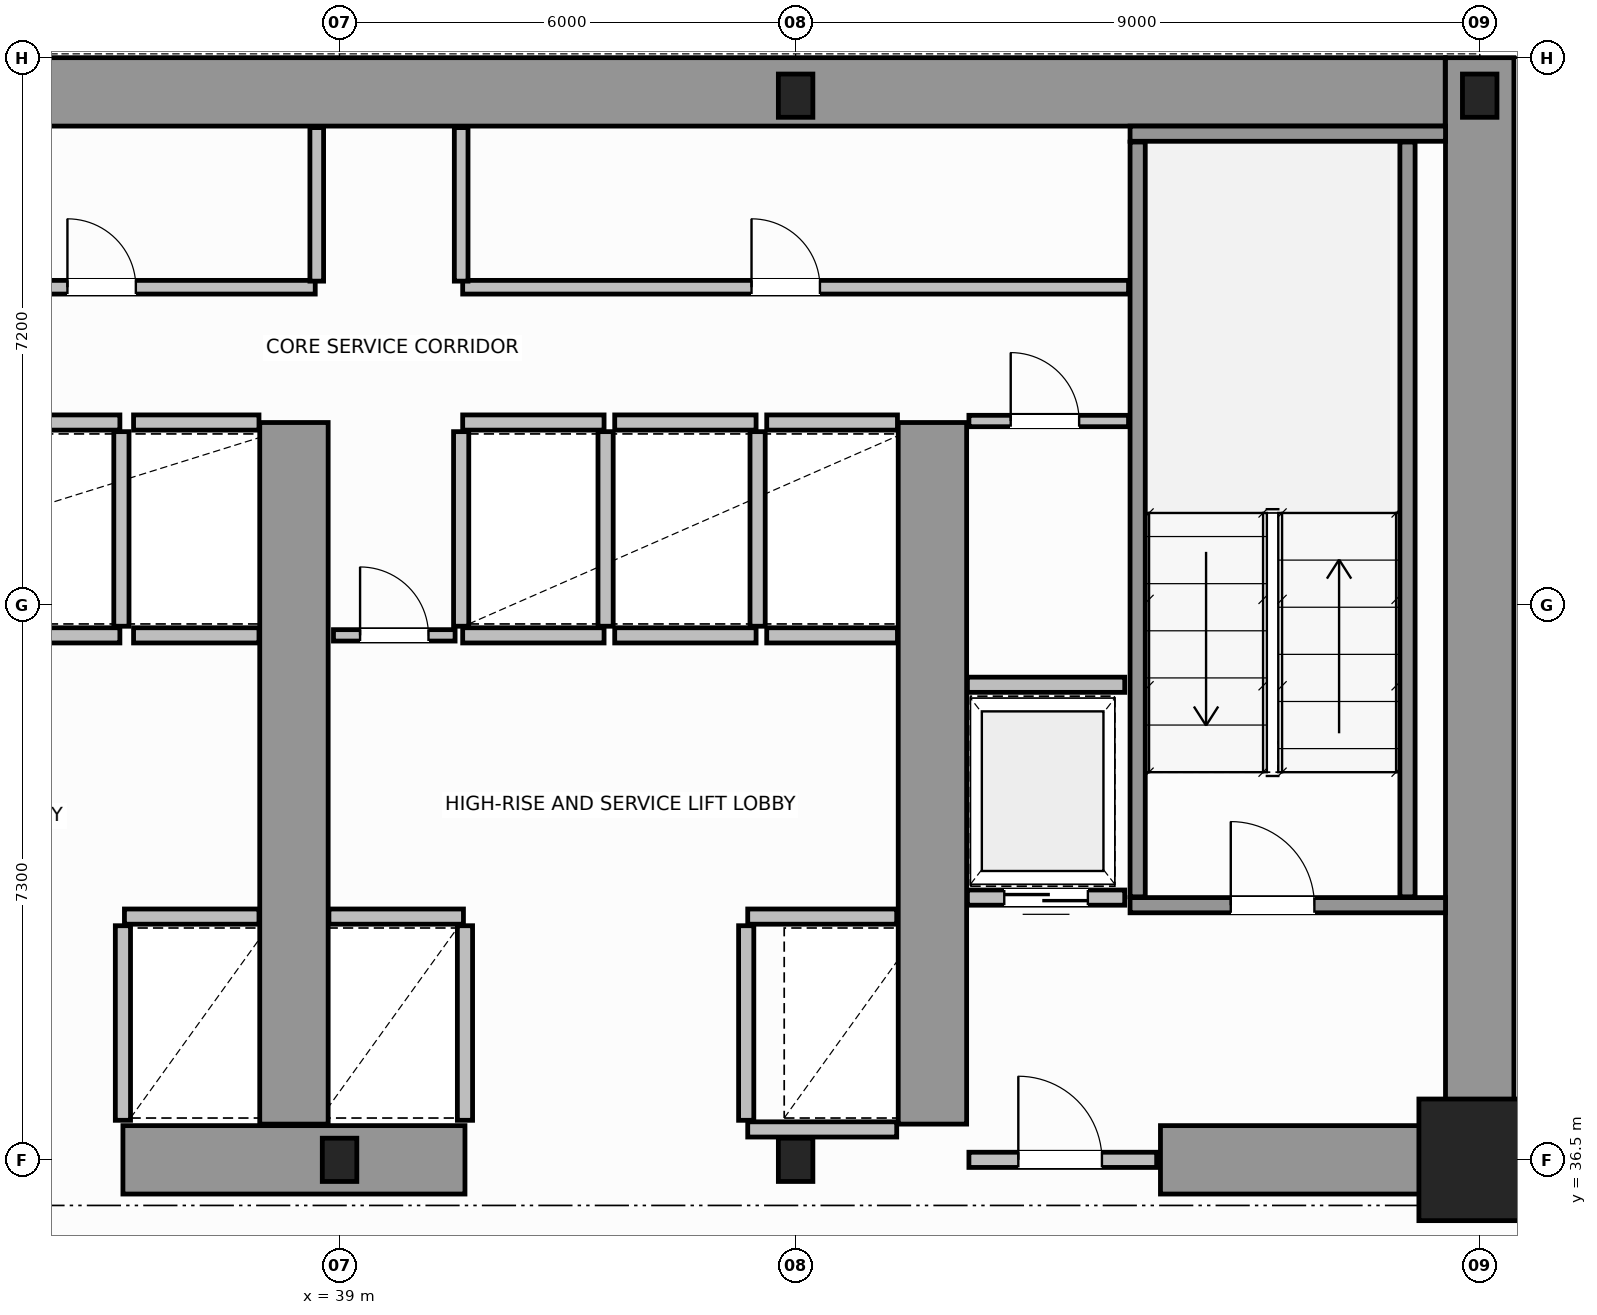
"""IFC4 building model, lengths in metres.
Left out: names, types, materials, properties, quantities, classifications, styles, units other than length and angle.
Written with IfcOpenShell. Run it as: python <this file> out.ifc"""

import sys

from ifc_helpers import new_model, si_unit, direction, frame, frame_2d, origin, origin_2d, place, context, subcontext, project, spatial, rectangle, i_section, extrude, source, transform, mapped, element, fill, save


model = new_model("IFC4")
c1 = context("Model", 3, precision=1e-05, world=origin(), true_north=direction((0.0, 1.0)))
c2 = subcontext(c1, "Body", "Model", "MODEL_VIEW")
j1 = project(units=[si_unit("LENGTHUNIT", "METRE"), si_unit("PLANEANGLEUNIT", "RADIAN")], contexts=[c1])
p1 = place(None, origin())
s1 = spatial("IfcSite", under=j1, at=p1, CompositionType="ELEMENT")
p2 = place(p1, origin())
s2 = spatial("IfcBuilding", under=s1, at=p2, CompositionType="ELEMENT")
p3 = place(p2, frame((0.0, 0.0, 41.6)))
s3 = spatial("IfcBuildingStorey", under=s2, at=p3, CompositionType="ELEMENT", Elevation=41.6)
m1 = source(origin(), c2, "Body", "SweptSolid", [
    extrude(i_section(OverallWidth=0.454, OverallDepth=0.569, WebThickness=0.078, FlangeThickness=0.08, FilletRadius=0.015, at=origin_2d()), origin(), (0.0, 0.0, 1.0), 3.8),
])
for number, where, z_axis, x_axis in (
    (1, (39.0, 36.5, 0.0), (0.0, 0.0, 1.0), (1.0, 0.0, 0.0)),
    (2, (45.0, 36.5, 0.0), (0.0, 0.0, 1.0), (1.0, 0.0, 0.0)),
):
    element("IfcColumn", number, at=place(p3, frame(where, z_axis=z_axis, x_axis=x_axis)), inside=s3, PredefinedType="COLUMN", context=c2, shape_type="MappedRepresentation", body=[
        mapped(m1, transform((0.0, 0.0, 0.0), scale=1.0)),
    ])
m2 = source(origin(), c2, "Body", "SweptSolid", [
    extrude(rectangle(XDim=1.6, YDim=1.6, at=origin_2d()), origin(), (0.0, 0.0, 1.0), 3.8),
])
p4 = place(p3, frame((54.0, 36.5, 0.0), z_axis=(0.0, 0.0, 1.0), x_axis=(1.0, 0.0, 0.0)))
e3 = element("IfcColumn", 3, at=p4, inside=s3, PredefinedType="COLUMN", context=c2, shape_type="MappedRepresentation", body=[
    mapped(m2, transform((0.0, 0.0, 0.0), scale=1.0)),
])
for number, where, z_axis, x_axis in (
    (4, (45.0, 50.5, 0.0), (0.0, 0.0, 1.0), (1.0, 0.0, 0.0)),
    (5, (54.0, 50.5, 0.0), (0.0, 0.0, 1.0), (1.0, 0.0, 0.0)),
):
    element("IfcColumn", number, at=place(p3, frame(where, z_axis=z_axis, x_axis=x_axis)), inside=s3, PredefinedType="COLUMN", context=c2, shape_type="MappedRepresentation", body=[
        mapped(m1, transform((0.0, 0.0, 0.0), scale=1.0)),
    ])
p5 = place(p3, frame((34.002, 50.55, 0.0), z_axis=(0.0, 0.0, 1.0), x_axis=(1.0, 0.0, 0.0)))
e6 = element("IfcWall", 6, at=p5, inside=s3, PredefinedType="SHEAR", context=c2, shape_type="SweptSolid", body=[
    extrude(rectangle(XDim=19.544, YDim=0.9, at=frame_2d((9.772, 0.0))), origin(), (0.0, 0.0, 1.0), 3.8),
])
p6 = place(p3, frame((54.0, 36.5, 0.0), z_axis=(0.0, 0.0, 1.0), x_axis=(0.0, 1.0, 0.0)))
e7 = element("IfcWall", 7, at=p6, inside=s3, PredefinedType="SHEAR", context=c2, shape_type="SweptSolid", body=[
    extrude(rectangle(XDim=14.5, YDim=0.9, at=frame_2d((7.25, 0.0))), origin(), (0.0, 0.0, 1.0), 3.8),
])
p7 = place(p3, frame((36.15, 36.5, 0.0), z_axis=(0.0, 0.0, 1.0), x_axis=(1.0, 0.0, 0.0)))
e8 = element("IfcWall", 8, at=p7, inside=s3, PredefinedType="SHEAR", context=c2, shape_type="SweptSolid", body=[
    extrude(rectangle(XDim=4.5, YDim=0.9, at=frame_2d((2.25, 0.0))), origin(), (0.0, 0.0, 1.0), 3.8),
])
p8 = place(p3, frame((49.8, 36.5, 0.0), z_axis=(0.0, 0.0, 1.0), x_axis=(1.0, 0.0, 0.0)))
e9 = element("IfcWall", 9, at=p8, inside=s3, PredefinedType="SHEAR", context=c2, shape_type="SweptSolid", body=[
    extrude(rectangle(XDim=3.73, YDim=0.9, at=frame_2d((1.865, 0.0))), origin(), (0.0, 0.0, 1.0), 2.38),
])
for number, where, z_axis, x_axis in (
    (10, (38.4, 36.97, 0.0), (0.0, 0.0, 1.0), (0.0, 1.0, 0.0)),
    (11, (46.8, 36.97, 0.0), (0.0, 0.0, 1.0), (0.0, 1.0, 0.0)),
):
    element("IfcWall", number, at=place(p3, frame(where, z_axis=z_axis, x_axis=x_axis)), inside=s3, PredefinedType="SHEAR", context=c2, shape_type="SweptSolid", body=[
        extrude(rectangle(XDim=9.23, YDim=0.9, at=frame_2d((4.615, 0.0))), origin(), (0.0, 0.0, 1.0), 3.8),
    ])
p9 = place(p3, frame((49.4, 39.85, 0.0), z_axis=(0.0, 0.0, 1.0), x_axis=(1.0, 0.0, 0.0)))
e12 = element("IfcWall", 12, at=p9, inside=s3, PredefinedType="SOLIDWALL", context=c2, shape_type="SweptSolid", body=[
    extrude(rectangle(XDim=4.15, YDim=0.2, at=frame_2d((2.075, 0.0))), origin(), (0.0, 0.0, 1.0), 3.8),
])
p10 = place(p9, frame((1.325, 0.0, 0.0)))
e13 = element("IfcOpeningElement", 13, at=p10, cuts=e12, PredefinedType="OPENING", context=c2, shape_type="SweptSolid", body=[
    extrude(rectangle(XDim=1.1, YDim=2.15, at=frame_2d((0.55, 1.075))), frame((0.0, 0.11, 0.0), z_axis=(0.0, -1.0, 0.0), x_axis=(1.0, 0.0, 0.0)), (0.0, 0.0, 1.0), 0.22),
])
p11 = place(p3, frame((49.4, 50.0, 0.0), z_axis=(0.0, 0.0, 1.0), x_axis=(1.0, 0.0, 0.0)))
e14 = element("IfcWall", 14, at=p11, inside=s3, PredefinedType="SOLIDWALL", context=c2, shape_type="SweptSolid", body=[
    extrude(rectangle(XDim=4.15, YDim=0.2, at=frame_2d((2.075, 0.0))), origin(), (0.0, 0.0, 1.0), 3.8),
])
for number, where, z_axis, x_axis in (
    (15, (49.5, 39.96, 0.0), (0.0, 0.0, 1.0), (0.0, 1.0, 0.0)),
    (16, (53.05, 39.96, 0.0), (0.0, 0.0, 1.0), (0.0, 1.0, 0.0)),
):
    element("IfcWall", number, at=place(p3, frame(where, z_axis=z_axis, x_axis=x_axis)), inside=s3, PredefinedType="SOLIDWALL", context=c2, shape_type="SweptSolid", body=[
        extrude(rectangle(XDim=9.93, YDim=0.2, at=frame_2d((4.965, 0.0))), origin(), (0.0, 0.0, 1.0), 3.8),
    ])
p12 = place(p3, frame((47.28, 36.5, 0.0), z_axis=(0.0, 0.0, 1.0), x_axis=(1.0, 0.0, 0.0)))
e17 = element("IfcWall", 17, at=p12, inside=s3, PredefinedType="SOLIDWALL", context=c2, shape_type="SweptSolid", body=[
    extrude(rectangle(XDim=2.47, YDim=0.2, at=frame_2d((1.235, 0.0))), origin(), (0.0, 0.0, 1.0), 2.37),
])
p13 = place(p12, frame((0.65, 0.0, 0.0)))
e18 = element("IfcOpeningElement", 18, at=p13, cuts=e17, PredefinedType="OPENING", context=c2, shape_type="SweptSolid", body=[
    extrude(rectangle(XDim=1.1, YDim=2.15, at=frame_2d((0.55, 1.075))), frame((0.0, 0.11, 0.0), z_axis=(0.0, -1.0, 0.0), x_axis=(1.0, 0.0, 0.0)), (0.0, 0.0, 1.0), 0.22),
])
p14 = place(p3, frame((36.17, 39.7, 0.0), z_axis=(0.0, 0.0, 1.0), x_axis=(1.0, 0.0, 0.0)))
e19 = element("IfcWall", 19, at=p14, inside=s3, PredefinedType="SOLIDWALL", context=c2, shape_type="SweptSolid", body=[
    extrude(rectangle(XDim=1.77, YDim=0.2, at=frame_2d((0.885, 0.0))), origin(), (0.0, 0.0, 1.0), 3.58),
])
p15 = place(p3, frame((36.15, 37.02, 0.0), z_axis=(0.0, 0.0, 1.0), x_axis=(0.0, 1.0, 0.0)))
e20 = element("IfcWall", 20, at=p15, inside=s3, PredefinedType="SOLIDWALL", context=c2, shape_type="SweptSolid", body=[
    extrude(rectangle(XDim=2.56, YDim=0.2, at=frame_2d((1.28, 0.0))), origin(), (0.0, 0.0, 1.0), 3.58),
])
for number, where, z_axis, x_axis in (
    (21, (34.19, 43.4, 0.0), (0.0, 0.0, 1.0), (1.0, 0.0, 0.0)),
    (22, (34.19, 46.2, 0.0), (0.0, 0.0, 1.0), (1.0, 0.0, 0.0)),
):
    element("IfcWall", number, at=place(p3, frame(where, z_axis=z_axis, x_axis=x_axis)), inside=s3, PredefinedType="SOLIDWALL", context=c2, shape_type="SweptSolid", body=[
        extrude(rectangle(XDim=1.92, YDim=0.2, at=frame_2d((0.96, 0.0))), origin(), (0.0, 0.0, 1.0), 3.58),
    ])
p16 = place(p3, frame((36.13, 43.52, 0.0), z_axis=(0.0, 0.0, 1.0), x_axis=(0.0, 1.0, 0.0)))
e23 = element("IfcWall", 23, at=p16, inside=s3, PredefinedType="SOLIDWALL", context=c2, shape_type="SweptSolid", body=[
    extrude(rectangle(XDim=2.56, YDim=0.2, at=frame_2d((1.28, 0.0))), origin(), (0.0, 0.0, 1.0), 3.58),
])
for number, where, z_axis, x_axis in (
    (24, (36.29, 43.4, 0.0), (0.0, 0.0, 1.0), (1.0, 0.0, 0.0)),
    (25, (36.29, 46.2, 0.0), (0.0, 0.0, 1.0), (1.0, 0.0, 0.0)),
):
    element("IfcWall", number, at=place(p3, frame(where, z_axis=z_axis, x_axis=x_axis)), inside=s3, PredefinedType="SOLIDWALL", context=c2, shape_type="SweptSolid", body=[
        extrude(rectangle(XDim=1.65, YDim=0.2, at=frame_2d((0.825, 0.0))), origin(), (0.0, 0.0, 1.0), 3.58),
    ])
p17 = place(p3, frame((38.86, 39.7, 0.0), z_axis=(0.0, 0.0, 1.0), x_axis=(1.0, 0.0, 0.0)))
e26 = element("IfcWall", 26, at=p17, inside=s3, PredefinedType="SOLIDWALL", context=c2, shape_type="SweptSolid", body=[
    extrude(rectangle(XDim=1.77, YDim=0.2, at=frame_2d((0.885, 0.0))), origin(), (0.0, 0.0, 1.0), 3.58),
])
p18 = place(p3, frame((40.65, 37.02, 0.0), z_axis=(0.0, 0.0, 1.0), x_axis=(0.0, 1.0, 0.0)))
e27 = element("IfcWall", 27, at=p18, inside=s3, PredefinedType="SOLIDWALL", context=c2, shape_type="SweptSolid", body=[
    extrude(rectangle(XDim=2.56, YDim=0.2, at=frame_2d((1.28, 0.0))), origin(), (0.0, 0.0, 1.0), 3.58),
])
p19 = place(p3, frame((44.37, 39.7, 0.0), z_axis=(0.0, 0.0, 1.0), x_axis=(1.0, 0.0, 0.0)))
e28 = element("IfcWall", 28, at=p19, inside=s3, PredefinedType="SOLIDWALL", context=c2, shape_type="SweptSolid", body=[
    extrude(rectangle(XDim=1.96, YDim=0.2, at=frame_2d((0.98, 0.0))), origin(), (0.0, 0.0, 1.0), 3.58),
])
p20 = place(p3, frame((44.37, 36.9, 0.0), z_axis=(0.0, 0.0, 1.0), x_axis=(1.0, 0.0, 0.0)))
e29 = element("IfcWall", 29, at=p20, inside=s3, PredefinedType="SOLIDWALL", context=c2, shape_type="SweptSolid", body=[
    extrude(rectangle(XDim=1.96, YDim=0.2, at=frame_2d((0.98, 0.0))), origin(), (0.0, 0.0, 1.0), 2.37),
])
p21 = place(p3, frame((44.35, 37.02, 0.0), z_axis=(0.0, 0.0, 1.0), x_axis=(0.0, 1.0, 0.0)))
e30 = element("IfcWall", 30, at=p21, inside=s3, PredefinedType="SOLIDWALL", context=c2, shape_type="SweptSolid", body=[
    extrude(rectangle(XDim=2.56, YDim=0.2, at=frame_2d((1.28, 0.0))), origin(), (0.0, 0.0, 1.0), 3.58),
])
for number, where, z_axis, x_axis in (
    (31, (40.62, 43.4, 0.0), (0.0, 0.0, 1.0), (1.0, 0.0, 0.0)),
    (32, (40.62, 46.2, 0.0), (0.0, 0.0, 1.0), (1.0, 0.0, 0.0)),
):
    element("IfcWall", number, at=place(p3, frame(where, z_axis=z_axis, x_axis=x_axis)), inside=s3, PredefinedType="SOLIDWALL", context=c2, shape_type="SweptSolid", body=[
        extrude(rectangle(XDim=1.86, YDim=0.2, at=frame_2d((0.93, 0.0))), origin(), (0.0, 0.0, 1.0), 3.58),
    ])
for number, where, z_axis, x_axis in (
    (33, (40.6, 43.52, 0.0), (0.0, 0.0, 1.0), (0.0, 1.0, 0.0)),
    (34, (42.5, 43.52, 0.0), (0.0, 0.0, 1.0), (0.0, 1.0, 0.0)),
):
    element("IfcWall", number, at=place(p3, frame(where, z_axis=z_axis, x_axis=x_axis)), inside=s3, PredefinedType="SOLIDWALL", context=c2, shape_type="SweptSolid", body=[
        extrude(rectangle(XDim=2.56, YDim=0.2, at=frame_2d((1.28, 0.0))), origin(), (0.0, 0.0, 1.0), 3.58),
    ])
for number, where, z_axis, x_axis in (
    (35, (42.62, 43.4, 0.0), (0.0, 0.0, 1.0), (1.0, 0.0, 0.0)),
    (36, (42.62, 46.2, 0.0), (0.0, 0.0, 1.0), (1.0, 0.0, 0.0)),
):
    element("IfcWall", number, at=place(p3, frame(where, z_axis=z_axis, x_axis=x_axis)), inside=s3, PredefinedType="SOLIDWALL", context=c2, shape_type="SweptSolid", body=[
        extrude(rectangle(XDim=1.86, YDim=0.2, at=frame_2d((0.93, 0.0))), origin(), (0.0, 0.0, 1.0), 3.58),
    ])
p22 = place(p3, frame((44.5, 43.52, 0.0), z_axis=(0.0, 0.0, 1.0), x_axis=(0.0, 1.0, 0.0)))
e37 = element("IfcWall", 37, at=p22, inside=s3, PredefinedType="SOLIDWALL", context=c2, shape_type="SweptSolid", body=[
    extrude(rectangle(XDim=2.56, YDim=0.2, at=frame_2d((1.28, 0.0))), origin(), (0.0, 0.0, 1.0), 3.58),
])
for number, where, z_axis, x_axis in (
    (38, (44.62, 43.4, 0.0), (0.0, 0.0, 1.0), (1.0, 0.0, 0.0)),
    (39, (44.62, 46.2, 0.0), (0.0, 0.0, 1.0), (1.0, 0.0, 0.0)),
):
    element("IfcWall", number, at=place(p3, frame(where, z_axis=z_axis, x_axis=x_axis)), inside=s3, PredefinedType="SOLIDWALL", context=c2, shape_type="SweptSolid", body=[
        extrude(rectangle(XDim=1.72, YDim=0.2, at=frame_2d((0.86, 0.0))), origin(), (0.0, 0.0, 1.0), 3.58),
    ])
p23 = place(p3, frame((47.26, 39.95, 0.0), z_axis=(0.0, 0.0, 1.0), x_axis=(1.0, 0.0, 0.0)))
e40 = element("IfcWall", 40, at=p23, inside=s3, PredefinedType="SOLIDWALL", context=c2, shape_type="SweptSolid", body=[
    extrude(rectangle(XDim=2.07, YDim=0.2, at=frame_2d((1.035, 0.0))), origin(), (0.0, 0.0, 1.0), 3.58),
])
p24 = place(p23, frame((0.485, 0.0, 0.0)))
e41 = element("IfcOpeningElement", 41, at=p24, cuts=e40, PredefinedType="OPENING", context=c2, shape_type="SweptSolid", body=[
    extrude(rectangle(XDim=1.1, YDim=2.15, at=frame_2d((0.55, 1.075))), frame((0.0, 0.11, 0.0), z_axis=(0.0, -1.0, 0.0), x_axis=(1.0, 0.0, 0.0)), (0.0, 0.0, 1.0), 0.22),
])
p25 = place(p3, frame((47.26, 42.75, 0.0), z_axis=(0.0, 0.0, 1.0), x_axis=(1.0, 0.0, 0.0)))
e42 = element("IfcWall", 42, at=p25, inside=s3, PredefinedType="SOLIDWALL", context=c2, shape_type="SweptSolid", body=[
    extrude(rectangle(XDim=2.07, YDim=0.2, at=frame_2d((1.035, 0.0))), origin(), (0.0, 0.0, 1.0), 3.58),
])
p26 = place(p3, frame((47.28, 46.22, 0.0), z_axis=(0.0, 0.0, 1.0), x_axis=(1.0, 0.0, 0.0)))
e43 = element("IfcWall", 43, at=p26, inside=s3, PredefinedType="PARTITIONING", context=c2, shape_type="SweptSolid", body=[
    extrude(rectangle(XDim=2.1, YDim=0.15, at=frame_2d((1.05, 0.0))), origin(), (0.0, 0.0, 1.0), 3.58),
])
p27 = place(p26, frame((0.55, 0.0, 0.0)))
e44 = element("IfcOpeningElement", 44, at=p27, cuts=e43, PredefinedType="OPENING", context=c2, shape_type="SweptSolid", body=[
    extrude(rectangle(XDim=0.9, YDim=2.1, at=frame_2d((0.45, 1.05))), frame((0.0, 0.085, 0.0), z_axis=(0.0, -1.0, 0.0), x_axis=(1.0, 0.0, 0.0)), (0.0, 0.0, 1.0), 0.17),
])
p28 = place(p3, frame((38.92, 43.4, 0.0), z_axis=(0.0, 0.0, 1.0), x_axis=(1.0, 0.0, 0.0)))
e45 = element("IfcWall", 45, at=p28, inside=s3, PredefinedType="PARTITIONING", context=c2, shape_type="SweptSolid", body=[
    extrude(rectangle(XDim=1.6, YDim=0.15, at=frame_2d((0.8, 0.0))), origin(), (0.0, 0.0, 1.0), 3.58),
])
p29 = place(p28, frame((0.35, 0.0, 0.0)))
e46 = element("IfcOpeningElement", 46, at=p29, cuts=e45, PredefinedType="OPENING", context=c2, shape_type="SweptSolid", body=[
    extrude(rectangle(XDim=0.9, YDim=2.1, at=frame_2d((0.45, 1.05))), frame((0.0, 0.085, 0.0), z_axis=(0.0, -1.0, 0.0), x_axis=(1.0, 0.0, 0.0)), (0.0, 0.0, 1.0), 0.17),
])
p30 = place(p3, frame((18.62, 47.98, 0.0), z_axis=(0.0, 0.0, 1.0), x_axis=(1.0, 0.0, 0.0)))
e47 = element("IfcWall", 47, at=p30, inside=s3, PredefinedType="PLUMBINGWALL", context=c2, shape_type="SweptSolid", body=[
    extrude(rectangle(XDim=20.06, YDim=0.18, at=frame_2d((10.03, 0.0))), origin(), (0.0, 0.0, 1.0), 3.58),
])
p31 = place(p30, frame((3.5, 0.0, 0.0)))
e48 = element("IfcOpeningElement", 48, at=p31, cuts=e47, PredefinedType="OPENING", context=c2, shape_type="SweptSolid", body=[
    extrude(rectangle(XDim=0.9, YDim=2.15, at=frame_2d((0.45, 1.075))), frame((0.0, 0.1, 0.0), z_axis=(0.0, -1.0, 0.0), x_axis=(1.0, 0.0, 0.0)), (0.0, 0.0, 1.0), 0.2),
])
p32 = place(p30, frame((10.8, 0.0, 0.0)))
e49 = element("IfcOpeningElement", 49, at=p32, cuts=e47, PredefinedType="OPENING", context=c2, shape_type="SweptSolid", body=[
    extrude(rectangle(XDim=0.9, YDim=2.15, at=frame_2d((0.45, 1.075))), frame((0.0, 0.1, 0.0), z_axis=(0.0, -1.0, 0.0), x_axis=(1.0, 0.0, 0.0)), (0.0, 0.0, 1.0), 0.2),
])
p33 = place(p30, frame((16.8, 0.0, 0.0)))
e50 = element("IfcOpeningElement", 50, at=p33, cuts=e47, PredefinedType="OPENING", context=c2, shape_type="SweptSolid", body=[
    extrude(rectangle(XDim=0.9, YDim=2.15, at=frame_2d((0.45, 1.075))), frame((0.0, 0.1, 0.0), z_axis=(0.0, -1.0, 0.0), x_axis=(1.0, 0.0, 0.0)), (0.0, 0.0, 1.0), 0.2),
])
p34 = place(p3, frame((40.62, 47.98, 0.0), z_axis=(0.0, 0.0, 1.0), x_axis=(1.0, 0.0, 0.0)))
e51 = element("IfcWall", 51, at=p34, inside=s3, PredefinedType="PLUMBINGWALL", context=c2, shape_type="SweptSolid", body=[
    extrude(rectangle(XDim=8.76, YDim=0.18, at=frame_2d((4.38, 0.0))), origin(), (0.0, 0.0, 1.0), 3.58),
])
p35 = place(p34, frame((3.8, 0.0, 0.0)))
e52 = element("IfcOpeningElement", 52, at=p35, cuts=e51, PredefinedType="OPENING", context=c2, shape_type="SweptSolid", body=[
    extrude(rectangle(XDim=0.9, YDim=2.15, at=frame_2d((0.45, 1.075))), frame((0.0, 0.1, 0.0), z_axis=(0.0, -1.0, 0.0), x_axis=(1.0, 0.0, 0.0)), (0.0, 0.0, 1.0), 0.2),
])
for number, where, z_axis, x_axis in (
    (53, (38.7, 48.06, 0.0), (0.0, 0.0, 1.0), (0.0, 1.0, 0.0)),
    (54, (40.6, 48.06, 0.0), (0.0, 0.0, 1.0), (0.0, 1.0, 0.0)),
):
    element("IfcWall", number, at=place(p3, frame(where, z_axis=z_axis, x_axis=x_axis)), inside=s3, PredefinedType="PLUMBINGWALL", context=c2, shape_type="SweptSolid", body=[
        extrude(rectangle(XDim=2.02, YDim=0.18, at=frame_2d((1.01, 0.0))), origin(), (0.0, 0.0, 1.0), 3.58),
    ])
p36 = place(p3, frame((54.06, 36.48, 0.0), z_axis=(0.0, 0.0, 1.0), x_axis=(1.0, 0.0, 0.0)))
e55 = element("IfcWall", 55, at=p36, inside=s3, PredefinedType="PARTITIONING", context=c2, shape_type="SweptSolid", body=[
    extrude(rectangle(XDim=6.672, YDim=0.12, at=frame_2d((3.336, 0.0))), origin(), (0.0, 0.0, 1.0), 2.77),
])
p37 = place(p36, frame((2.886, 0.0, 0.0)))
e56 = element("IfcOpeningElement", 56, at=p37, cuts=e55, PredefinedType="OPENING", context=c2, shape_type="SweptSolid", body=[
    extrude(rectangle(XDim=0.9, YDim=2.15, at=frame_2d((0.45, 1.075))), frame((0.0, 0.07, 0.0), z_axis=(0.0, -1.0, 0.0), x_axis=(1.0, 0.0, 0.0)), (0.0, 0.0, 1.0), 0.14),
])
m3 = source(origin(), c2, "Body", "SweptSolid", [
    extrude(rectangle(XDim=1.1, YDim=2.15, at=frame_2d((0.55, 1.075))), frame((0.0, 0.025, 0.0), z_axis=(0.0, -1.0, 0.0), x_axis=(1.0, 0.0, 0.0)), (0.0, 0.0, 1.0), 0.05),
])
p38 = place(p10, origin())
e57 = element("IfcDoor", 57, at=p38, inside=s3, OperationType="SINGLE_SWING_RIGHT", PredefinedType="DOOR", context=c2, shape_type="MappedRepresentation", body=[
    mapped(m3, transform((0.0, 0.0, 0.0), scale=1.0)),
])
fill(e13, e57)
p39 = place(p13, origin())
e58 = element("IfcDoor", 58, at=p39, inside=s3, OperationType="SINGLE_SWING_LEFT", PredefinedType="DOOR", context=c2, shape_type="MappedRepresentation", body=[
    mapped(m3, transform((0.0, 0.0, 0.0), scale=1.0)),
])
fill(e18, e58)
p40 = place(p24, origin())
e59 = element("IfcDoor", 59, at=p40, inside=s3, OperationType="DOUBLE_DOOR_SLIDING", PredefinedType="DOOR", context=c2, shape_type="MappedRepresentation", body=[
    mapped(m3, transform((0.0, 0.0, 0.0), scale=1.0)),
])
fill(e41, e59)
m4 = source(origin(), c2, "Body", "SweptSolid", [
    extrude(rectangle(XDim=0.9, YDim=2.1, at=frame_2d((0.45, 1.05))), frame((0.0, 0.025, 0.0), z_axis=(0.0, -1.0, 0.0), x_axis=(1.0, 0.0, 0.0)), (0.0, 0.0, 1.0), 0.05),
])
p41 = place(p27, origin())
e60 = element("IfcDoor", 60, at=p41, inside=s3, OperationType="SINGLE_SWING_RIGHT", PredefinedType="DOOR", context=c2, shape_type="MappedRepresentation", body=[
    mapped(m4, transform((0.0, 0.0, 0.0), scale=1.0)),
])
fill(e44, e60)
p42 = place(p29, origin())
e61 = element("IfcDoor", 61, at=p42, inside=s3, OperationType="SINGLE_SWING_LEFT", PredefinedType="DOOR", context=c2, shape_type="MappedRepresentation", body=[
    mapped(m4, transform((0.0, 0.0, 0.0), scale=1.0)),
])
fill(e46, e61)
m5 = source(origin(), c2, "Body", "SweptSolid", [
    extrude(rectangle(XDim=0.9, YDim=2.15, at=frame_2d((0.45, 1.075))), frame((0.0, 0.025, 0.0), z_axis=(0.0, -1.0, 0.0), x_axis=(1.0, 0.0, 0.0)), (0.0, 0.0, 1.0), 0.05),
])
p43 = place(p33, origin())
e62 = element("IfcDoor", 62, at=p43, inside=s3, OperationType="SINGLE_SWING_LEFT", PredefinedType="DOOR", context=c2, shape_type="MappedRepresentation", body=[
    mapped(m5, transform((0.0, 0.0, 0.0), scale=1.0)),
])
fill(e50, e62)
p44 = place(p35, origin())
e63 = element("IfcDoor", 63, at=p44, inside=s3, OperationType="SINGLE_SWING_RIGHT", PredefinedType="DOOR", context=c2, shape_type="MappedRepresentation", body=[
    mapped(m5, transform((0.0, 0.0, 0.0), scale=1.0)),
])
fill(e52, e63)
save(model, sys.argv[1])
